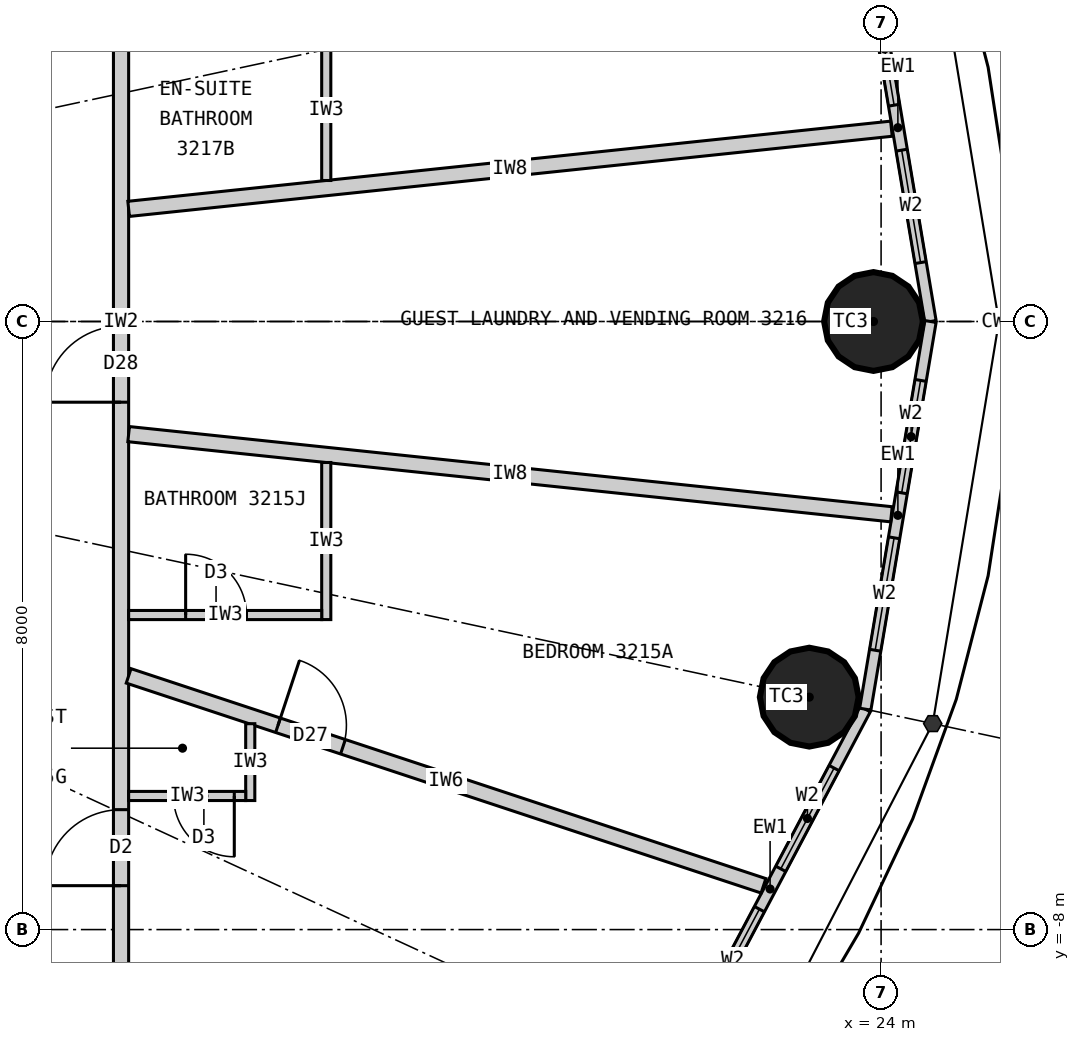
"""IFC4 building model, lengths in metres.
Left out: names, types, materials, properties, quantities, classifications, styles, units other than length and angle.
Written with IfcOpenShell. Run it as: python <this file> out.ifc"""

import sys

from ifc_helpers import new_model, si_unit, direction, frame, frame_2d, origin, origin_2d, place, context, subcontext, project, spatial, rectangle, circle, extrude, element, fill, save


model = new_model("IFC4")
c1 = context("Model", 3, precision=1e-05, world=origin(), true_north=direction((0.0, 1.0)))
c2 = subcontext(c1, "Body", "Model", "MODEL_VIEW")
j1 = project(units=[si_unit("LENGTHUNIT", "METRE"), si_unit("PLANEANGLEUNIT", "RADIAN")], contexts=[c1])
p1 = place(None, origin())
s1 = spatial("IfcSite", under=j1, at=p1, CompositionType="ELEMENT")
p2 = place(p1, origin())
s2 = spatial("IfcBuilding", under=s1, at=p2, CompositionType="ELEMENT")
p3 = place(p2, frame((0.0, 0.0, 125.4)))
s3 = spatial("IfcBuildingStorey", under=s2, at=p3, CompositionType="ELEMENT", Elevation=125.4)
for number, where, z_axis, x_axis in (
    (1, (23.9, 0.0, 0.0), (0.0, 0.0, 1.0), (1.0, 0.0, 0.0)),
    (2, (23.055, -4.942, 0.0), (0.0, 0.0, 1.0), (1.0, 0.0, 0.0)),
):
    element("IfcColumn", number, at=place(p3, frame(where, z_axis=z_axis, x_axis=x_axis)), inside=s3, PredefinedType="COLUMN", context=c2, shape_type="SweptSolid", body=[
        extrude(circle(Radius=0.65, at=origin_2d()), origin(), (0.0, 0.0, 1.0), 3.3),
    ])
p4 = place(p3, frame((24.65, 0.0, 0.0), z_axis=(0.0, 0.0, 1.0), x_axis=(-0.165883894218, 0.986145290329, 0.0)))
e3 = element("IfcWall", 3, at=p4, inside=s3, PredefinedType="ELEMENTEDWALL", context=c2, shape_type="SweptSolid", body=[
    extrude(rectangle(XDim=5.172, YDim=0.15, at=frame_2d((2.586, 0.0))), origin(), (0.0, 0.0, 1.0), 3.12),
])
p5 = place(p4, frame((0.786, 0.0, 0.9)))
e4 = element("IfcOpeningElement", 4, at=p5, cuts=e3, PredefinedType="OPENING", context=c2, shape_type="SweptSolid", body=[
    extrude(rectangle(XDim=1.5, YDim=1.9, at=frame_2d((0.75, 0.95))), frame((0.0, 0.085, 0.0), z_axis=(0.0, -1.0, 0.0), x_axis=(1.0, 0.0, 0.0)), (0.0, 0.0, 1.0), 0.17),
])
p6 = place(p4, frame((2.886, 0.0, 0.9)))
e5 = element("IfcOpeningElement", 5, at=p6, cuts=e3, PredefinedType="OPENING", context=c2, shape_type="SweptSolid", body=[
    extrude(rectangle(XDim=1.5, YDim=1.9, at=frame_2d((0.75, 0.95))), frame((0.0, 0.085, 0.0), z_axis=(0.0, -1.0, 0.0), x_axis=(1.0, 0.0, 0.0)), (0.0, 0.0, 1.0), 0.17),
])
p7 = place(p3, frame((21.287, -9.832, 0.0), z_axis=(0.0, 0.0, 1.0), x_axis=(0.467814388454, 0.883826735257, 0.0)))
e6 = element("IfcWall", 6, at=p7, inside=s3, PredefinedType="ELEMENTEDWALL", context=c2, shape_type="SweptSolid", body=[
    extrude(rectangle(XDim=5.354, YDim=0.15, at=frame_2d((2.677, 0.0))), origin(), (0.0, 0.0, 1.0), 3.12),
])
p8 = place(p7, frame((0.877, 0.0, 0.9)))
e7 = element("IfcOpeningElement", 7, at=p8, cuts=e6, PredefinedType="OPENING", context=c2, shape_type="SweptSolid", body=[
    extrude(rectangle(XDim=1.5, YDim=1.9, at=frame_2d((0.75, 0.95))), frame((0.0, 0.085, 0.0), z_axis=(0.0, -1.0, 0.0), x_axis=(1.0, 0.0, 0.0)), (0.0, 0.0, 1.0), 0.17),
])
p9 = place(p7, frame((2.977, 0.0, 0.9)))
e8 = element("IfcOpeningElement", 8, at=p9, cuts=e6, PredefinedType="OPENING", context=c2, shape_type="SweptSolid", body=[
    extrude(rectangle(XDim=1.5, YDim=1.9, at=frame_2d((0.75, 0.95))), frame((0.0, 0.085, 0.0), z_axis=(0.0, -1.0, 0.0), x_axis=(1.0, 0.0, 0.0)), (0.0, 0.0, 1.0), 0.17),
])
p10 = place(p3, frame((23.792, -5.1, 0.0), z_axis=(0.0, 0.0, 1.0), x_axis=(0.165883894218, 0.986145290329, 0.0)))
e9 = element("IfcWall", 9, at=p10, inside=s3, PredefinedType="ELEMENTEDWALL", context=c2, shape_type="SweptSolid", body=[
    extrude(rectangle(XDim=5.172, YDim=0.15, at=frame_2d((2.586, 0.0))), origin(), (0.0, 0.0, 1.0), 3.12),
])
p11 = place(p10, frame((0.786, 0.0, 0.9)))
e10 = element("IfcOpeningElement", 10, at=p11, cuts=e9, PredefinedType="OPENING", context=c2, shape_type="SweptSolid", body=[
    extrude(rectangle(XDim=1.5, YDim=1.9, at=frame_2d((0.75, 0.95))), frame((0.0, 0.085, 0.0), z_axis=(0.0, -1.0, 0.0), x_axis=(1.0, 0.0, 0.0)), (0.0, 0.0, 1.0), 0.17),
])
p12 = place(p10, frame((2.886, 0.0, 0.9)))
e11 = element("IfcOpeningElement", 11, at=p12, cuts=e9, PredefinedType="OPENING", context=c2, shape_type="SweptSolid", body=[
    extrude(rectangle(XDim=1.5, YDim=1.9, at=frame_2d((0.75, 0.95))), frame((0.0, 0.085, 0.0), z_axis=(0.0, -1.0, 0.0), x_axis=(1.0, 0.0, 0.0)), (0.0, 0.0, 1.0), 0.17),
])
p13 = place(p3, frame((14.0, -9.9, 0.0), z_axis=(0.0, 0.0, 1.0), x_axis=(0.0, 1.0, 0.0)))
e12 = element("IfcWall", 12, at=p13, inside=s3, PredefinedType="PARTITIONING", context=c2, shape_type="SweptSolid", body=[
    extrude(rectangle(XDim=19.8, YDim=0.2, at=frame_2d((9.9, 0.0))), origin(), (0.0, 0.0, 1.0), 3.12),
])
p14 = place(p13, frame((2.478, 0.0, 0.0)))
e13 = element("IfcOpeningElement", 13, at=p14, cuts=e12, PredefinedType="OPENING", context=c2, shape_type="SweptSolid", body=[
    extrude(rectangle(XDim=1.0, YDim=2.2, at=frame_2d((0.5, 1.1))), frame((0.0, 0.11, 0.0), z_axis=(0.0, -1.0, 0.0), x_axis=(1.0, 0.0, 0.0)), (0.0, 0.0, 1.0), 0.22),
])
p15 = place(p13, frame((8.838, 0.0, 0.0)))
e14 = element("IfcOpeningElement", 14, at=p15, cuts=e12, PredefinedType="OPENING", context=c2, shape_type="SweptSolid", body=[
    extrude(rectangle(XDim=1.0, YDim=2.2, at=frame_2d((0.5, 1.1))), frame((0.0, 0.11, 0.0), z_axis=(0.0, -1.0, 0.0), x_axis=(1.0, 0.0, 0.0)), (0.0, 0.0, 1.0), 0.22),
])
p16 = place(p13, frame((13.742, 0.0, 0.0)))
e15 = element("IfcOpeningElement", 15, at=p16, cuts=e12, PredefinedType="OPENING", context=c2, shape_type="SweptSolid", body=[
    extrude(rectangle(XDim=1.0, YDim=2.2, at=frame_2d((0.5, 1.1))), frame((0.0, 0.11, 0.0), z_axis=(0.0, -1.0, 0.0), x_axis=(1.0, 0.0, 0.0)), (0.0, 0.0, 1.0), 0.22),
])
p17 = place(p13, frame((18.698, 0.0, 0.0)))
e16 = element("IfcOpeningElement", 16, at=p17, cuts=e12, PredefinedType="OPENING", context=c2, shape_type="SweptSolid", body=[
    extrude(rectangle(XDim=1.0, YDim=2.2, at=frame_2d((0.5, 1.1))), frame((0.0, 0.11, 0.0), z_axis=(0.0, -1.0, 0.0), x_axis=(1.0, 0.0, 0.0)), (0.0, 0.0, 1.0), 0.22),
])
p18 = place(p3, frame((14.1, 1.482, 0.0), z_axis=(0.0, 0.0, 1.0), x_axis=(0.994523202615, 0.104516024894, 0.0)))
e17 = element("IfcWall", 17, at=p18, inside=s3, PredefinedType="PARTITIONING", context=c2, shape_type="SweptSolid", body=[
    extrude(rectangle(XDim=10.091, YDim=0.2, at=frame_2d((5.045, 0.0))), origin(), (0.0, 0.0, 1.0), 2.47),
])
p19 = place(p3, frame((14.1, -4.662, 0.0), z_axis=(0.0, 0.0, 1.0), x_axis=(0.949446466373, -0.313928984789, 0.0)))
e18 = element("IfcWall", 18, at=p19, inside=s3, PredefinedType="PARTITIONING", context=c2, shape_type="SweptSolid", body=[
    extrude(rectangle(XDim=8.797, YDim=0.2, at=frame_2d((4.399, 0.0))), origin(), (0.0, 0.0, 1.0), 3.12),
])
p20 = place(p19, frame((2.07, 0.0, 0.0)))
e19 = element("IfcOpeningElement", 19, at=p20, cuts=e18, PredefinedType="OPENING", context=c2, shape_type="SweptSolid", body=[
    extrude(rectangle(XDim=0.9, YDim=2.1, at=frame_2d((0.45, 1.05))), frame((0.0, 0.11, 0.0), z_axis=(0.0, -1.0, 0.0), x_axis=(1.0, 0.0, 0.0)), (0.0, 0.0, 1.0), 0.22),
])
p21 = place(p3, frame((14.1, -1.482, 0.0), z_axis=(0.0, 0.0, 1.0), x_axis=(0.994523202615, -0.104516024894, 0.0)))
e20 = element("IfcWall", 20, at=p21, inside=s3, PredefinedType="PARTITIONING", context=c2, shape_type="SweptSolid", body=[
    extrude(rectangle(XDim=10.091, YDim=0.2, at=frame_2d((5.045, 0.0))), origin(), (0.0, 0.0, 1.0), 2.47),
])
p22 = place(p3, frame((15.7, -5.291, 0.0), z_axis=(0.0, 0.0, 1.0), x_axis=(0.0, -1.0, 0.0)))
e21 = element("IfcWall", 21, at=p22, inside=s3, PredefinedType="PARTITIONING", context=c2, shape_type="SweptSolid", body=[
    extrude(rectangle(XDim=1.011, YDim=0.12, at=frame_2d((0.505, 0.0))), origin(), (0.0, 0.0, 1.0), 3.12),
])
p23 = place(p3, frame((14.1, -6.242, 0.0), z_axis=(0.0, 0.0, 1.0), x_axis=(1.0, 0.0, 0.0)))
e22 = element("IfcWall", 22, at=p23, inside=s3, PredefinedType="PARTITIONING", context=c2, shape_type="SweptSolid", body=[
    extrude(rectangle(XDim=1.54, YDim=0.12, at=frame_2d((0.77, 0.0))), origin(), (0.0, 0.0, 1.0), 3.12),
])
p24 = place(p23, frame((0.59, 0.0, 0.0)))
e23 = element("IfcOpeningElement", 23, at=p24, cuts=e22, PredefinedType="OPENING", context=c2, shape_type="SweptSolid", body=[
    extrude(rectangle(XDim=0.8, YDim=2.1, at=frame_2d((0.4, 1.05))), frame((0.0, 0.07, 0.0), z_axis=(0.0, -1.0, 0.0), x_axis=(1.0, 0.0, 0.0)), (0.0, 0.0, 1.0), 0.14),
])
p25 = place(p3, frame((16.7, -1.855, 0.0), z_axis=(0.0, 0.0, 1.0), x_axis=(0.0, -1.0, 0.0)))
e24 = element("IfcWall", 24, at=p25, inside=s3, PredefinedType="PARTITIONING", context=c2, shape_type="SweptSolid", body=[
    extrude(rectangle(XDim=2.067, YDim=0.12, at=frame_2d((1.033, 0.0))), origin(), (0.0, 0.0, 1.0), 3.12),
])
p26 = place(p3, frame((14.1, -3.862, 0.0), z_axis=(0.0, 0.0, 1.0), x_axis=(1.0, 0.0, 0.0)))
e25 = element("IfcWall", 25, at=p26, inside=s3, PredefinedType="PARTITIONING", context=c2, shape_type="SweptSolid", body=[
    extrude(rectangle(XDim=2.54, YDim=0.12, at=frame_2d((1.27, 0.0))), origin(), (0.0, 0.0, 1.0), 2.37),
])
p27 = place(p26, frame((0.75, 0.0, 0.0)))
e26 = element("IfcOpeningElement", 26, at=p27, cuts=e25, PredefinedType="OPENING", context=c2, shape_type="SweptSolid", body=[
    extrude(rectangle(XDim=0.8, YDim=2.1, at=frame_2d((0.4, 1.05))), frame((0.0, 0.07, 0.0), z_axis=(0.0, -1.0, 0.0), x_axis=(1.0, 0.0, 0.0)), (0.0, 0.0, 1.0), 0.14),
])
p28 = place(p3, frame((16.7, 1.855, 0.0), z_axis=(0.0, 0.0, 1.0), x_axis=(0.0, 1.0, 0.0)))
e27 = element("IfcWall", 27, at=p28, inside=s3, PredefinedType="PARTITIONING", context=c2, shape_type="SweptSolid", body=[
    extrude(rectangle(XDim=1.867, YDim=0.12, at=frame_2d((0.933, 0.0))), origin(), (0.0, 0.0, 1.0), 3.12),
])
p29 = place(p5, origin())
e28 = element("IfcWindow", 28, at=p29, inside=s3, PartitioningType="SINGLE_PANEL", PredefinedType="WINDOW", context=c2, shape_type="SweptSolid", body=[
    extrude(rectangle(XDim=1.5, YDim=1.9, at=frame_2d((0.75, 0.95))), frame((0.0, 0.03, 0.0), z_axis=(0.0, -1.0, 0.0), x_axis=(1.0, 0.0, 0.0)), (0.0, 0.0, 1.0), 0.06),
])
fill(e4, e28)
p30 = place(p6, origin())
e29 = element("IfcWindow", 29, at=p30, inside=s3, PartitioningType="SINGLE_PANEL", PredefinedType="WINDOW", context=c2, shape_type="SweptSolid", body=[
    extrude(rectangle(XDim=1.5, YDim=1.9, at=frame_2d((0.75, 0.95))), frame((0.0, 0.03, 0.0), z_axis=(0.0, -1.0, 0.0), x_axis=(1.0, 0.0, 0.0)), (0.0, 0.0, 1.0), 0.06),
])
fill(e5, e29)
p31 = place(p8, origin())
e30 = element("IfcWindow", 30, at=p31, inside=s3, PartitioningType="SINGLE_PANEL", PredefinedType="WINDOW", context=c2, shape_type="SweptSolid", body=[
    extrude(rectangle(XDim=1.5, YDim=1.9, at=frame_2d((0.75, 0.95))), frame((0.0, 0.03, 0.0), z_axis=(0.0, -1.0, 0.0), x_axis=(1.0, 0.0, 0.0)), (0.0, 0.0, 1.0), 0.06),
])
fill(e7, e30)
p32 = place(p9, origin())
e31 = element("IfcWindow", 31, at=p32, inside=s3, PartitioningType="SINGLE_PANEL", PredefinedType="WINDOW", context=c2, shape_type="SweptSolid", body=[
    extrude(rectangle(XDim=1.5, YDim=1.9, at=frame_2d((0.75, 0.95))), frame((0.0, 0.03, 0.0), z_axis=(0.0, -1.0, 0.0), x_axis=(1.0, 0.0, 0.0)), (0.0, 0.0, 1.0), 0.06),
])
fill(e8, e31)
p33 = place(p11, origin())
e32 = element("IfcWindow", 32, at=p33, inside=s3, PartitioningType="SINGLE_PANEL", PredefinedType="WINDOW", context=c2, shape_type="SweptSolid", body=[
    extrude(rectangle(XDim=1.5, YDim=1.9, at=frame_2d((0.75, 0.95))), frame((0.0, 0.03, 0.0), z_axis=(0.0, -1.0, 0.0), x_axis=(1.0, 0.0, 0.0)), (0.0, 0.0, 1.0), 0.06),
])
fill(e10, e32)
p34 = place(p12, origin())
e33 = element("IfcWindow", 33, at=p34, inside=s3, PartitioningType="SINGLE_PANEL", PredefinedType="WINDOW", context=c2, shape_type="SweptSolid", body=[
    extrude(rectangle(XDim=1.5, YDim=1.9, at=frame_2d((0.75, 0.95))), frame((0.0, 0.03, 0.0), z_axis=(0.0, -1.0, 0.0), x_axis=(1.0, 0.0, 0.0)), (0.0, 0.0, 1.0), 0.06),
])
fill(e11, e33)
p35 = place(p24, origin())
e34 = element("IfcDoor", 34, at=p35, inside=s3, OperationType="SINGLE_SWING_RIGHT", PredefinedType="DOOR", context=c2, shape_type="SweptSolid", body=[
    extrude(rectangle(XDim=0.8, YDim=2.1, at=frame_2d((0.4, 1.05))), frame((0.0, 0.025, 0.0), z_axis=(0.0, -1.0, 0.0), x_axis=(1.0, 0.0, 0.0)), (0.0, 0.0, 1.0), 0.05),
])
fill(e23, e34)
p36 = place(p14, origin())
e35 = element("IfcDoor", 35, at=p36, inside=s3, OperationType="SINGLE_SWING_LEFT", PredefinedType="DOOR", context=c2, shape_type="SweptSolid", body=[
    extrude(rectangle(XDim=1.0, YDim=2.2, at=frame_2d((0.5, 1.1))), frame((0.0, 0.025, 0.0), z_axis=(0.0, -1.0, 0.0), x_axis=(1.0, 0.0, 0.0)), (0.0, 0.0, 1.0), 0.05),
])
fill(e13, e35)
p37 = place(p27, origin())
e36 = element("IfcDoor", 36, at=p37, inside=s3, OperationType="SINGLE_SWING_LEFT", PredefinedType="DOOR", context=c2, shape_type="SweptSolid", body=[
    extrude(rectangle(XDim=0.8, YDim=2.1, at=frame_2d((0.4, 1.05))), frame((0.0, 0.025, 0.0), z_axis=(0.0, -1.0, 0.0), x_axis=(1.0, 0.0, 0.0)), (0.0, 0.0, 1.0), 0.05),
])
fill(e26, e36)
p38 = place(p20, origin())
e37 = element("IfcDoor", 37, at=p38, inside=s3, OperationType="SINGLE_SWING_LEFT", PredefinedType="DOOR", context=c2, shape_type="SweptSolid", body=[
    extrude(rectangle(XDim=0.9, YDim=2.1, at=frame_2d((0.45, 1.05))), frame((0.0, 0.025, 0.0), z_axis=(0.0, -1.0, 0.0), x_axis=(1.0, 0.0, 0.0)), (0.0, 0.0, 1.0), 0.05),
])
fill(e19, e37)
p39 = place(p15, origin())
e38 = element("IfcDoor", 38, at=p39, inside=s3, OperationType="SINGLE_SWING_LEFT", PredefinedType="DOOR", context=c2, shape_type="SweptSolid", body=[
    extrude(rectangle(XDim=1.0, YDim=2.2, at=frame_2d((0.5, 1.1))), frame((0.0, 0.025, 0.0), z_axis=(0.0, -1.0, 0.0), x_axis=(1.0, 0.0, 0.0)), (0.0, 0.0, 1.0), 0.05),
])
fill(e14, e38)
save(model, sys.argv[1])
